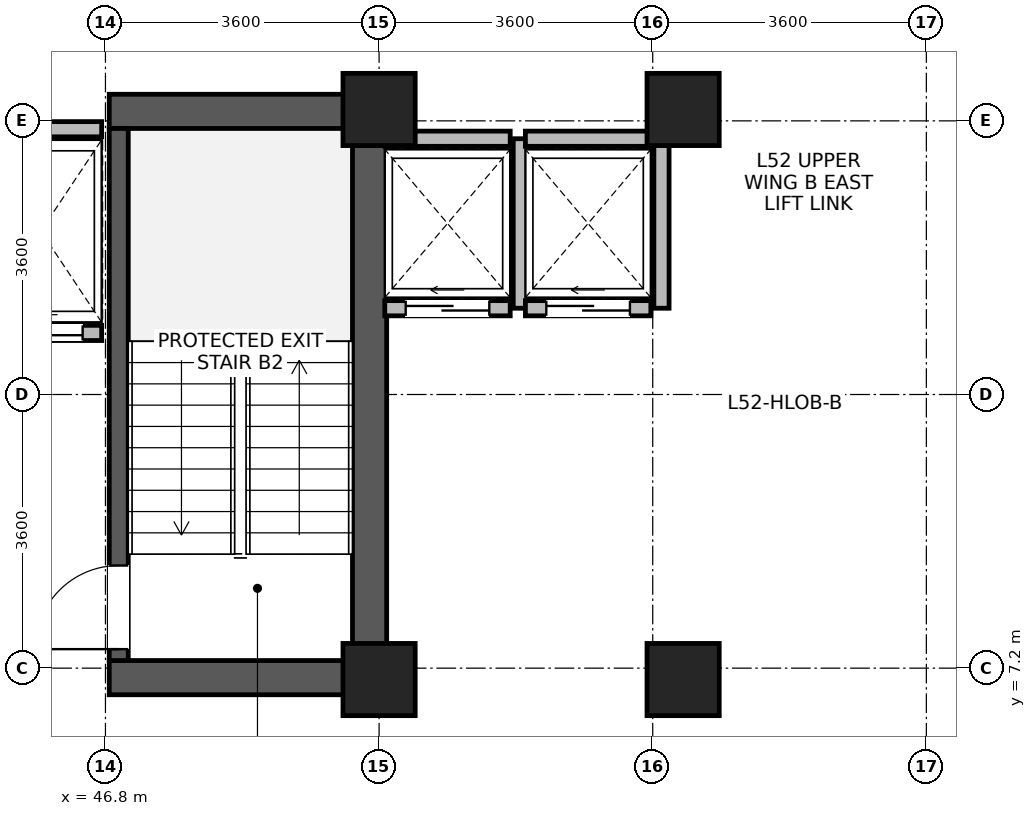
"""IFC4 building model, lengths in metres.
Left out: names, types, materials, properties, quantities, classifications, styles, units other than length and angle.
Written with IfcOpenShell. Run it as: python <this file> out.ifc"""

import sys

from ifc_helpers import new_model, si_unit, direction, frame, frame_2d, origin, origin_2d, place, context, subcontext, project, spatial, rectangle, extrude, source, transform, mapped, element, fill, save


model = new_model("IFC4")
c1 = context("Model", 3, precision=1e-05, world=origin(), true_north=direction((0.0, 1.0)))
c2 = subcontext(c1, "Body", "Model", "MODEL_VIEW")
j1 = project(units=[si_unit("LENGTHUNIT", "METRE"), si_unit("PLANEANGLEUNIT", "RADIAN")], contexts=[c1])
p1 = place(None, origin())
s1 = spatial("IfcSite", under=j1, at=p1, CompositionType="ELEMENT")
p2 = place(p1, origin())
s2 = spatial("IfcBuilding", under=s1, at=p2, CompositionType="ELEMENT")
p3 = place(p2, frame((0.0, 0.0, 205.5)))
s3 = spatial("IfcBuildingStorey", under=s2, at=p3, CompositionType="ELEMENT", Elevation=205.5)
p4 = place(p3, frame((50.275, 6.85, 0.0), z_axis=(0.0, 0.0, 1.0), x_axis=(0.0, 1.0, 0.0)))
e1 = element("IfcWall", 1, at=p4, inside=s3, PredefinedType="SHEAR", context=c2, shape_type="SweptSolid", body=[
    extrude(rectangle(XDim=7.9, YDim=0.45, at=frame_2d((3.95, 0.0))), origin(), (0.0, 0.0, 1.0), 3.47),
])
for number, where, z_axis, x_axis in (
    (2, (46.85, 7.075, 0.0), (0.0, 0.0, 1.0), (1.0, 0.0, 0.0)),
    (3, (46.85, 14.525, 0.0), (0.0, 0.0, 1.0), (1.0, 0.0, 0.0)),
):
    element("IfcWall", number, at=place(p3, frame(where, z_axis=z_axis, x_axis=x_axis)), inside=s3, PredefinedType="SHEAR", context=c2, shape_type="SweptSolid", body=[
        extrude(rectangle(XDim=3.2, YDim=0.45, at=frame_2d((1.6, 0.0))), origin(), (0.0, 0.0, 1.0), 3.47),
    ])
p5 = place(p3, frame((46.975, 7.3, 0.0), z_axis=(0.0, 0.0, 1.0), x_axis=(0.0, 1.0, 0.0)))
e4 = element("IfcWall", 4, at=p5, inside=s3, PredefinedType="SHEAR", context=c2, shape_type="SweptSolid", body=[
    extrude(rectangle(XDim=7.0, YDim=0.25, at=frame_2d((3.5, 0.0))), origin(), (0.0, 0.0, 1.0), 3.47),
])
p6 = place(p5, frame((0.15, 0.0, 0.0)))
e5 = element("IfcOpeningElement", 5, at=p6, cuts=e4, PredefinedType="OPENING", context=c2, shape_type="SweptSolid", body=[
    extrude(rectangle(XDim=1.1, YDim=2.08, at=frame_2d((0.55, 1.04))), frame((0.0, 0.135, 0.0), z_axis=(0.0, -1.0, 0.0), x_axis=(1.0, 0.0, 0.0)), (0.0, 0.0, 1.0), 0.27),
])
m1 = source(origin(), c2, "Body", "SweptSolid", [
    extrude(rectangle(XDim=0.95, YDim=0.95, at=origin_2d()), origin(), (0.0, 0.0, 1.0), 3.7),
])
for number, where, z_axis, x_axis in (
    (6, (50.4, 7.05, 0.0), (0.0, 0.0, 1.0), (1.0, 0.0, 0.0)),
    (7, (50.4, 14.55, 0.0), (0.0, 0.0, 1.0), (1.0, 0.0, 0.0)),
    (8, (54.4, 7.05, 0.0), (0.0, 0.0, 1.0), (1.0, 0.0, 0.0)),
    (9, (54.4, 14.55, 0.0), (0.0, 0.0, 1.0), (1.0, 0.0, 0.0)),
):
    element("IfcColumn", number, at=place(p3, frame(where, z_axis=z_axis, x_axis=x_axis)), inside=s3, PredefinedType="COLUMN", context=c2, shape_type="MappedRepresentation", body=[
        mapped(m1, transform((0.0, 0.0, 0.0), x_axis=(1.0, 0.0, 0.0), y_axis=(0.0, 1.0, 0.0), z_axis=(0.0, 0.0, 1.0), scale=1.0)),
    ])
p7 = place(p3, frame((50.475, 11.935, 0.0), z_axis=(0.0, 0.0, 1.0), x_axis=(1.0, 0.0, 0.0)))
e10 = element("IfcWall", 10, at=p7, inside=s3, PredefinedType="PARTITIONING", context=c2, shape_type="SweptSolid", body=[
    extrude(rectangle(XDim=1.65, YDim=0.2, at=frame_2d((0.825, 0.0))), origin(), (0.0, 0.0, 1.0), 3.45),
])
p8 = place(p7, frame((0.275, 0.0, 0.0)))
e11 = element("IfcOpeningElement", 11, at=p8, cuts=e10, PredefinedType="OPENING", context=c2, shape_type="SweptSolid", body=[
    extrude(rectangle(XDim=1.1, YDim=2.12, at=frame_2d((0.55, 1.06))), frame((0.0, 0.11, 0.0), z_axis=(0.0, -1.0, 0.0), x_axis=(1.0, 0.0, 0.0)), (0.0, 0.0, 1.0), 0.22),
])
p9 = place(p3, frame((50.475, 14.165, 0.0), z_axis=(0.0, 0.0, 1.0), x_axis=(1.0, 0.0, 0.0)))
e12 = element("IfcWall", 12, at=p9, inside=s3, PredefinedType="PARTITIONING", context=c2, shape_type="SweptSolid", body=[
    extrude(rectangle(XDim=1.65, YDim=0.2, at=frame_2d((0.825, 0.0))), origin(), (0.0, 0.0, 1.0), 3.45),
])
p10 = place(p3, frame((52.265, 11.935, 0.0), z_axis=(0.0, 0.0, 1.0), x_axis=(0.0, 1.0, 0.0)))
e13 = element("IfcWall", 13, at=p10, inside=s3, PredefinedType="PARTITIONING", context=c2, shape_type="SweptSolid", body=[
    extrude(rectangle(XDim=2.23, YDim=0.2, at=frame_2d((1.115, 0.0))), origin(), (0.0, 0.0, 1.0), 3.45),
])
p11 = place(p3, frame((52.325, 11.935, 0.0), z_axis=(0.0, 0.0, 1.0), x_axis=(1.0, 0.0, 0.0)))
e14 = element("IfcWall", 14, at=p11, inside=s3, PredefinedType="PARTITIONING", context=c2, shape_type="SweptSolid", body=[
    extrude(rectangle(XDim=1.65, YDim=0.2, at=frame_2d((0.825, 0.0))), origin(), (0.0, 0.0, 1.0), 3.45),
])
p12 = place(p11, frame((0.275, 0.0, 0.0)))
e15 = element("IfcOpeningElement", 15, at=p12, cuts=e14, PredefinedType="OPENING", context=c2, shape_type="SweptSolid", body=[
    extrude(rectangle(XDim=1.1, YDim=2.12, at=frame_2d((0.55, 1.06))), frame((0.0, 0.11, 0.0), z_axis=(0.0, -1.0, 0.0), x_axis=(1.0, 0.0, 0.0)), (0.0, 0.0, 1.0), 0.22),
])
p13 = place(p3, frame((52.325, 14.165, 0.0), z_axis=(0.0, 0.0, 1.0), x_axis=(1.0, 0.0, 0.0)))
e16 = element("IfcWall", 16, at=p13, inside=s3, PredefinedType="PARTITIONING", context=c2, shape_type="SweptSolid", body=[
    extrude(rectangle(XDim=1.65, YDim=0.2, at=frame_2d((0.825, 0.0))), origin(), (0.0, 0.0, 1.0), 3.45),
])
p14 = place(p3, frame((54.115, 11.935, 0.0), z_axis=(0.0, 0.0, 1.0), x_axis=(0.0, 1.0, 0.0)))
e17 = element("IfcWall", 17, at=p14, inside=s3, PredefinedType="PARTITIONING", context=c2, shape_type="SweptSolid", body=[
    extrude(rectangle(XDim=2.23, YDim=0.2, at=frame_2d((1.115, 0.0))), origin(), (0.0, 0.0, 1.0), 3.45),
])
p15 = place(p3, frame((45.15, 11.61, 0.0), z_axis=(0.0, 0.0, 1.0), x_axis=(1.0, 0.0, 0.0)))
e18 = element("IfcWall", 18, at=p15, inside=s3, PredefinedType="PARTITIONING", context=c2, shape_type="SweptSolid", body=[
    extrude(rectangle(XDim=1.6, YDim=0.2, at=frame_2d((0.8, 0.0))), origin(), (0.0, 0.0, 1.0), 3.45),
])
p16 = place(p15, frame((0.25, 0.0, 0.0)))
e19 = element("IfcOpeningElement", 19, at=p16, cuts=e18, PredefinedType="OPENING", context=c2, shape_type="SweptSolid", body=[
    extrude(rectangle(XDim=1.1, YDim=2.12, at=frame_2d((0.55, 1.06))), frame((0.0, 0.11, 0.0), z_axis=(0.0, -1.0, 0.0), x_axis=(1.0, 0.0, 0.0)), (0.0, 0.0, 1.0), 0.22),
])
p17 = place(p3, frame((45.15, 14.29, 0.0), z_axis=(0.0, 0.0, 1.0), x_axis=(1.0, 0.0, 0.0)))
e20 = element("IfcWall", 20, at=p17, inside=s3, PredefinedType="PARTITIONING", context=c2, shape_type="SweptSolid", body=[
    extrude(rectangle(XDim=1.6, YDim=0.2, at=frame_2d((0.8, 0.0))), origin(), (0.0, 0.0, 1.0), 2.45),
])
p18 = place(p6, origin())
e21 = element("IfcDoor", 21, at=p18, inside=s3, OperationType="SINGLE_SWING_LEFT", PredefinedType="DOOR", context=c2, shape_type="SweptSolid", body=[
    extrude(rectangle(XDim=1.1, YDim=2.08, at=frame_2d((0.55, 1.04))), frame((0.0, 0.025, 0.0), z_axis=(0.0, -1.0, 0.0), x_axis=(1.0, 0.0, 0.0)), (0.0, 0.0, 1.0), 0.05),
])
fill(e5, e21)
p19 = place(p8, origin())
e22 = element("IfcDoor", 22, at=p19, inside=s3, OperationType="SLIDING_TO_LEFT", PredefinedType="DOOR", context=c2, shape_type="SweptSolid", body=[
    extrude(rectangle(XDim=1.1, YDim=2.12, at=frame_2d((0.55, 1.06))), frame((0.0, 0.025, 0.0), z_axis=(0.0, -1.0, 0.0), x_axis=(1.0, 0.0, 0.0)), (0.0, 0.0, 1.0), 0.05),
])
fill(e11, e22)
p20 = place(p12, origin())
e23 = element("IfcDoor", 23, at=p20, inside=s3, OperationType="SLIDING_TO_LEFT", PredefinedType="DOOR", context=c2, shape_type="SweptSolid", body=[
    extrude(rectangle(XDim=1.1, YDim=2.12, at=frame_2d((0.55, 1.06))), frame((0.0, 0.025, 0.0), z_axis=(0.0, -1.0, 0.0), x_axis=(1.0, 0.0, 0.0)), (0.0, 0.0, 1.0), 0.05),
])
fill(e15, e23)
p21 = place(p16, origin())
e24 = element("IfcDoor", 24, at=p21, inside=s3, OperationType="SLIDING_TO_LEFT", PredefinedType="DOOR", context=c2, shape_type="SweptSolid", body=[
    extrude(rectangle(XDim=1.1, YDim=2.12, at=frame_2d((0.55, 1.06))), frame((0.0, 0.025, 0.0), z_axis=(0.0, -1.0, 0.0), x_axis=(1.0, 0.0, 0.0)), (0.0, 0.0, 1.0), 0.05),
])
fill(e19, e24)
save(model, sys.argv[1])
